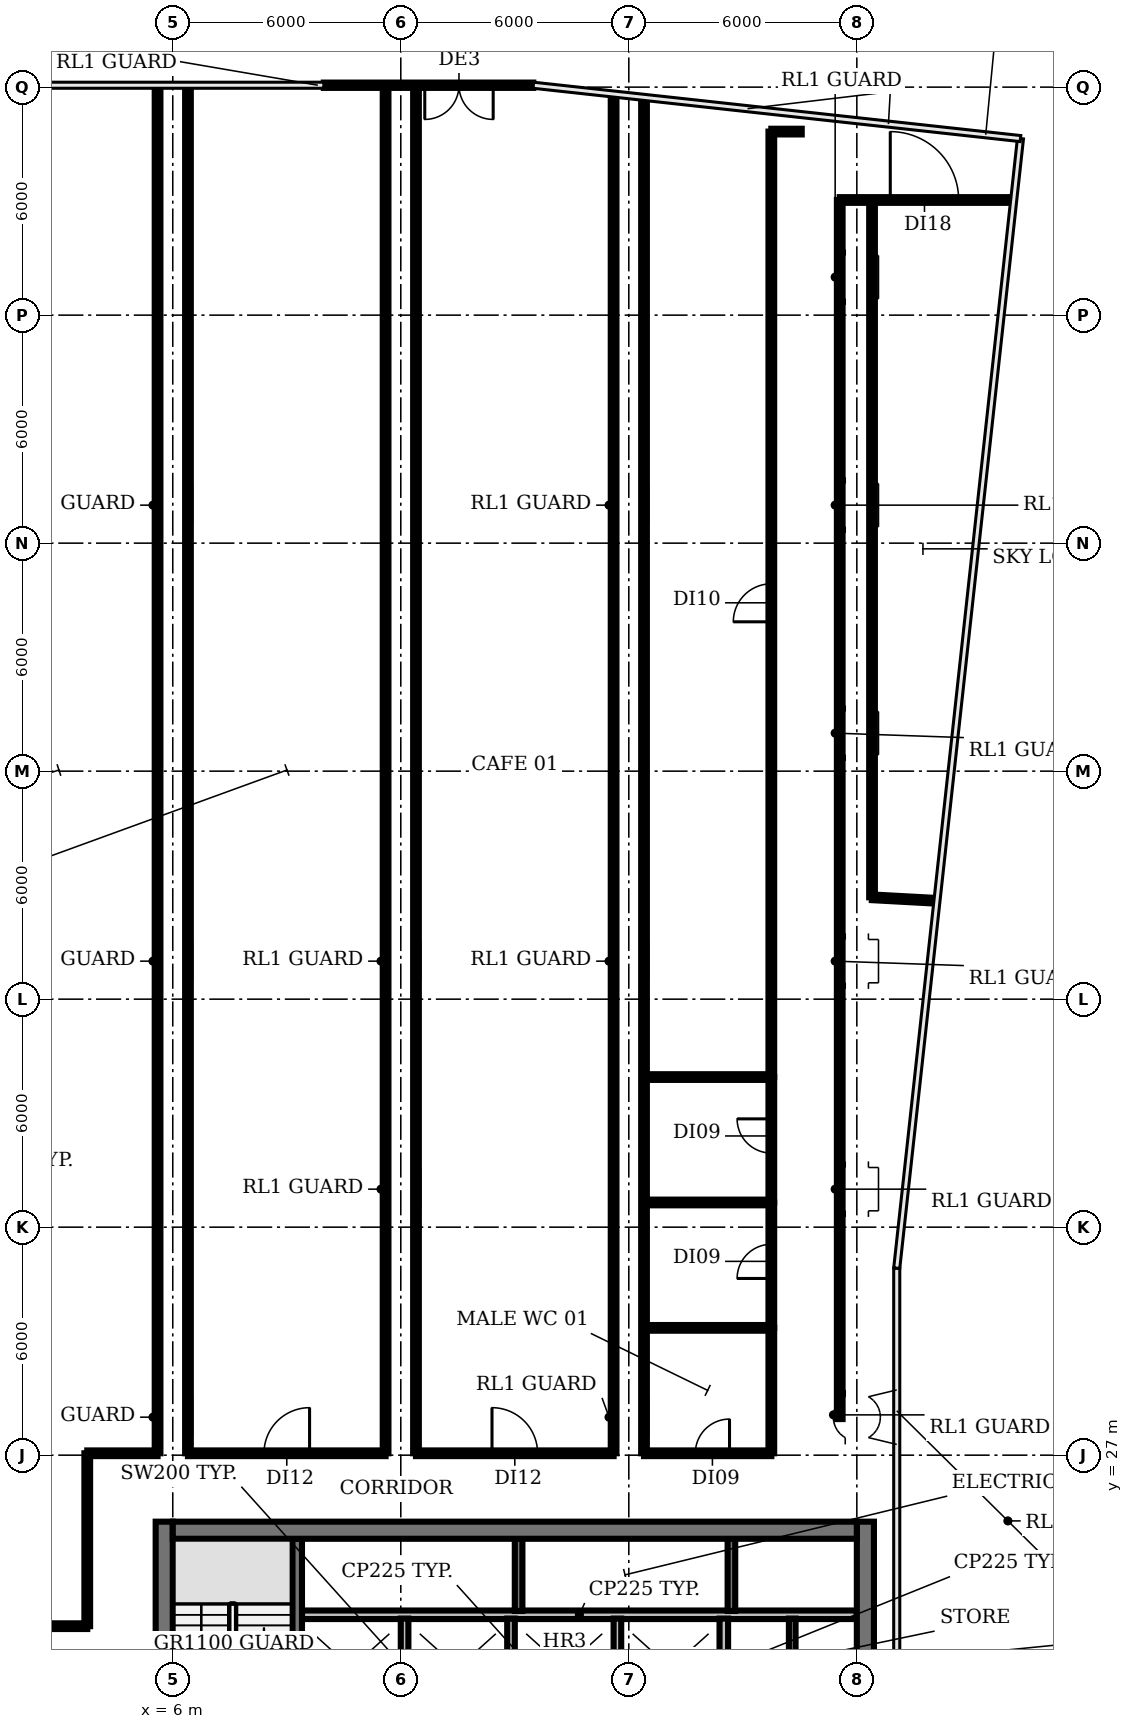
"""IFC4 building model, lengths in metres.
Left out: names, types, materials, properties, quantities, classifications, styles, units other than length and angle.
Written with IfcOpenShell. Run it as: python <this file> out.ifc"""

import sys

from ifc_helpers import new_model, si_unit, direction, frame, frame_2d, origin, place, context, subcontext, project, spatial, rectangle, extrude, element, fill, save


model = new_model("IFC4")
c1 = context("Model", 3, precision=1e-05, world=origin(), true_north=direction((0.0, 1.0)))
c2 = subcontext(c1, "Body", "Model", "MODEL_VIEW")
j1 = project(units=[si_unit("LENGTHUNIT", "METRE"), si_unit("PLANEANGLEUNIT", "RADIAN")], contexts=[c1])
p1 = place(None, origin())
s1 = spatial("IfcSite", under=j1, at=p1, CompositionType="ELEMENT")
p2 = place(p1, origin())
s2 = spatial("IfcBuilding", under=s1, at=p2, CompositionType="ELEMENT")
p3 = place(p2, frame((0.0, 0.0, 255.8)))
s3 = spatial("IfcBuildingStorey", under=s2, at=p3, CompositionType="ELEMENT", Elevation=255.8)
p4 = place(p3, frame((15.487, 63.05, 0.0), z_axis=(0.0, 0.0, 1.0), x_axis=(-1.0, 0.0, 0.0)))
e1 = element("IfcWall", 1, at=p4, inside=s3, PredefinedType="SOLIDWALL", context=c2, shape_type="SweptSolid", body=[
    extrude(rectangle(XDim=5.512, YDim=0.14, at=frame_2d((2.756, 0.0))), origin(), (0.0, 0.0, 1.0), 8.05),
])
p5 = place(p4, frame((1.056, 0.0, 0.0)))
e2 = element("IfcOpeningElement", 2, at=p5, cuts=e1, PredefinedType="OPENING", context=c2, shape_type="SweptSolid", body=[
    extrude(rectangle(XDim=1.8, YDim=2.4, at=frame_2d((0.9, 1.2))), frame((0.0, 0.08, 0.0), z_axis=(0.0, -1.0, 0.0), x_axis=(1.0, 0.0, 0.0)), (0.0, 0.0, 1.0), 0.16),
])
p6 = place(p3, frame((9.4, 22.8, 0.0), z_axis=(0.0, 0.0, 1.0), x_axis=(1.0, 0.0, 0.0)))
e3 = element("IfcWall", 3, at=p6, inside=s3, PredefinedType="PARTITIONING", context=c2, shape_type="SweptSolid", body=[
    extrude(rectangle(XDim=14.6, YDim=0.225, at=frame_2d((7.3, 0.0))), origin(), (0.0, 0.0, 1.0), 8.05),
])
p7 = place(p3, frame((9.275, 18.375, 0.0), z_axis=(0.0, 0.0, 1.0), x_axis=(0.0, 1.0, 0.0)))
e4 = element("IfcWall", 4, at=p7, inside=s3, PredefinedType="SHEAR", context=c2, shape_type="SweptSolid", body=[
    extrude(rectangle(XDim=6.425, YDim=0.25, at=frame_2d((3.212, 0.0))), origin(), (0.0, 0.0, 1.0), 8.05),
])
for number, where, z_axis, x_axis in (
    (5, (12.1, 20.1, 0.0), (0.0, 0.0, 1.0), (0.0, 1.0, 0.0)),
    (6, (14.9, 20.1, 0.0), (0.0, 0.0, 1.0), (0.0, 1.0, 0.0)),
):
    element("IfcWall", number, at=place(p3, frame(where, z_axis=z_axis, x_axis=x_axis)), inside=s3, PredefinedType="SOLIDWALL", context=c2, shape_type="SweptSolid", body=[
        extrude(rectangle(XDim=2.6, YDim=0.2, at=frame_2d((1.3, 0.0))), origin(), (0.0, 0.0, 1.0), 8.05),
    ])
p8 = place(p3, frame((15.1, 22.9, 0.0), z_axis=(0.0, 0.0, 1.0), x_axis=(0.0, 1.0, 0.0)))
e7 = element("IfcWall", 7, at=p8, inside=s3, PredefinedType="SHEAR", context=c2, shape_type="SweptSolid", body=[
    extrude(rectangle(XDim=1.9, YDim=0.2, at=frame_2d((0.95, 0.0))), origin(), (0.0, 0.0, 1.0), 8.05),
])
p9 = place(p3, frame((17.7, 20.1, 0.0), z_axis=(0.0, 0.0, 1.0), x_axis=(0.0, 1.0, 0.0)))
e8 = element("IfcWall", 8, at=p9, inside=s3, PredefinedType="SOLIDWALL", context=c2, shape_type="SweptSolid", body=[
    extrude(rectangle(XDim=2.6, YDim=0.2, at=frame_2d((1.3, 0.0))), origin(), (0.0, 0.0, 1.0), 8.05),
])
p10 = place(p3, frame((20.5, 20.1, 0.0), z_axis=(0.0, 0.0, 1.0), x_axis=(0.0, 1.0, 0.0)))
e9 = element("IfcWall", 9, at=p10, inside=s3, PredefinedType="PARTITIONING", context=c2, shape_type="SweptSolid", body=[
    extrude(rectangle(XDim=2.6, YDim=0.225, at=frame_2d((1.3, 0.0))), origin(), (0.0, 0.0, 1.0), 8.05),
])
p11 = place(p3, frame((20.7, 22.9, 0.0), z_axis=(0.0, 0.0, 1.0), x_axis=(0.0, 1.0, 0.0)))
e10 = element("IfcWall", 10, at=p11, inside=s3, PredefinedType="SHEAR", context=c2, shape_type="SweptSolid", body=[
    extrude(rectangle(XDim=1.9, YDim=0.2, at=frame_2d((0.95, 0.0))), origin(), (0.0, 0.0, 1.0), 8.05),
])
p12 = place(p3, frame((22.3, 20.1, 0.0), z_axis=(0.0, 0.0, 1.0), x_axis=(0.0, 1.0, 0.0)))
e11 = element("IfcWall", 11, at=p12, inside=s3, PredefinedType="PARTITIONING", context=c2, shape_type="SweptSolid", body=[
    extrude(rectangle(XDim=2.6, YDim=0.175, at=frame_2d((1.3, 0.0))), origin(), (0.0, 0.0, 1.0), 8.05),
])
p13 = place(p3, frame((5.775, 4.95, 0.0), z_axis=(0.0, 0.0, 1.0), x_axis=(0.0, 1.0, 0.0)))
e12 = element("IfcWall", 12, at=p13, inside=s3, PredefinedType="SHEAR", context=c2, shape_type="SweptSolid", body=[
    extrude(rectangle(XDim=20.3, YDim=0.45, at=frame_2d((10.15, 0.0))), origin(), (0.0, 0.0, 1.0), 8.05),
])
p14 = place(p13, frame((0.7, 0.0, 0.0)))
e13 = element("IfcOpeningElement", 13, at=p14, cuts=e12, PredefinedType="OPENING", context=c2, shape_type="SweptSolid", body=[
    extrude(rectangle(XDim=1.5, YDim=2.1, at=frame_2d((0.75, 1.05))), frame((0.0, 0.235, 0.0), z_axis=(0.0, -1.0, 0.0), x_axis=(1.0, 0.0, 0.0)), (0.0, 0.0, 1.0), 0.47),
])
p15 = place(p13, frame((7.15, 0.0, 0.0)))
e14 = element("IfcOpeningElement", 14, at=p15, cuts=e12, PredefinedType="OPENING", context=c2, shape_type="SweptSolid", body=[
    extrude(rectangle(XDim=1.2, YDim=2.1, at=frame_2d((0.6, 1.05))), frame((0.0, 0.235, 0.0), z_axis=(0.0, -1.0, 0.0), x_axis=(1.0, 0.0, 0.0)), (0.0, 0.0, 1.0), 0.47),
])
p16 = place(p13, frame((13.7, 0.0, 0.0)))
e15 = element("IfcOpeningElement", 15, at=p16, cuts=e12, PredefinedType="OPENING", context=c2, shape_type="SweptSolid", body=[
    extrude(rectangle(XDim=1.2, YDim=2.1, at=frame_2d((0.6, 1.05))), frame((0.0, 0.235, 0.0), z_axis=(0.0, -1.0, 0.0), x_axis=(1.0, 0.0, 0.0)), (0.0, 0.0, 1.0), 0.47),
])
p17 = place(p3, frame((24.225, 25.25, 0.0), z_axis=(0.0, 0.0, 1.0), x_axis=(0.0, -1.0, 0.0)))
e16 = element("IfcWall", 16, at=p17, inside=s3, PredefinedType="SHEAR", context=c2, shape_type="SweptSolid", body=[
    extrude(rectangle(XDim=20.3, YDim=0.45, at=frame_2d((10.15, 0.0))), origin(), (0.0, 0.0, 1.0), 8.05),
])
p18 = place(p17, frame((18.1, 0.0, 0.0)))
e17 = element("IfcOpeningElement", 17, at=p18, cuts=e16, PredefinedType="OPENING", context=c2, shape_type="SweptSolid", body=[
    extrude(rectangle(XDim=1.5, YDim=2.1, at=frame_2d((0.75, 1.05))), frame((0.0, 0.235, 0.0), z_axis=(0.0, -1.0, 0.0), x_axis=(1.0, 0.0, 0.0)), (0.0, 0.0, 1.0), 0.47),
])
p19 = place(p17, frame((12.0, 0.0, 0.0)))
e18 = element("IfcOpeningElement", 18, at=p19, cuts=e16, PredefinedType="OPENING", context=c2, shape_type="SweptSolid", body=[
    extrude(rectangle(XDim=0.9, YDim=2.1, at=frame_2d((0.45, 1.05))), frame((0.0, 0.235, 0.0), z_axis=(0.0, -1.0, 0.0), x_axis=(1.0, 0.0, 0.0)), (0.0, 0.0, 1.0), 0.47),
])
p20 = place(p17, frame((6.0, 0.0, 0.0)))
e19 = element("IfcOpeningElement", 19, at=p20, cuts=e16, PredefinedType="OPENING", context=c2, shape_type="SweptSolid", body=[
    extrude(rectangle(XDim=2.0, YDim=2.1, at=frame_2d((1.0, 1.05))), frame((0.0, 0.235, 0.0), z_axis=(0.0, -1.0, 0.0), x_axis=(1.0, 0.0, 0.0)), (0.0, 0.0, 1.0), 0.47),
])
p21 = place(p3, frame((6.0, 25.025, 0.0), z_axis=(0.0, 0.0, 1.0), x_axis=(1.0, 0.0, 0.0)))
e20 = element("IfcWall", 20, at=p21, inside=s3, PredefinedType="SHEAR", context=c2, shape_type="SweptSolid", body=[
    extrude(rectangle(XDim=18.0, YDim=0.45, at=frame_2d((9.0, 0.0))), origin(), (0.0, 0.0, 1.0), 8.05),
])
p22 = place(p3, frame((2.64, 22.5, 0.0), z_axis=(0.0, 0.0, 1.0), x_axis=(1.0, 0.0, 0.0)))
e21 = element("IfcWall", 21, at=p22, inside=s3, PredefinedType="PARTITIONING", context=c2, shape_type="SweptSolid", body=[
    extrude(rectangle(XDim=1.11, YDim=0.15, at=frame_2d((0.555, 0.0))), origin(), (0.0, 0.0, 1.0), 6.33),
])
p23 = place(p3, frame((3.75, 22.5, 0.0), z_axis=(0.0, 0.0, 1.0), x_axis=(0.0, 1.0, 0.0)))
e22 = element("IfcWall", 22, at=p23, inside=s3, PredefinedType="PARTITIONING", context=c2, shape_type="SweptSolid", body=[
    extrude(rectangle(XDim=4.55, YDim=0.15, at=frame_2d((2.275, 0.0))), origin(), (0.0, 0.0, 1.0), 6.33),
])
p24 = place(p3, frame((3.75, 27.05, 0.0), z_axis=(0.0, 0.0, 1.0), x_axis=(1.0, 0.0, 0.0)))
e23 = element("IfcWall", 23, at=p24, inside=s3, PredefinedType="PARTITIONING", context=c2, shape_type="SweptSolid", body=[
    extrude(rectangle(XDim=1.85, YDim=0.15, at=frame_2d((0.925, 0.0))), origin(), (0.0, 0.0, 1.0), 6.33),
])
for number, where, z_axis, x_axis in (
    (24, (5.6, 27.05, 0.0), (0.0, 0.0, 1.0), (0.0, 1.0, 0.0)),
    (25, (6.4, 27.05, 0.0), (0.0, 0.0, 1.0), (0.0, 1.0, 0.0)),
):
    element("IfcWall", number, at=place(p3, frame(where, z_axis=z_axis, x_axis=x_axis)), inside=s3, PredefinedType="PARTITIONING", context=c2, shape_type="SweptSolid", body=[
        extrude(rectangle(XDim=35.95, YDim=0.15, at=frame_2d((17.975, 0.0))), origin(), (0.0, 0.0, 1.0), 6.33),
    ])
p25 = place(p3, frame((6.4, 27.05, 0.0), z_axis=(0.0, 0.0, 1.0), x_axis=(1.0, 0.0, 0.0)))
e26 = element("IfcWall", 26, at=p25, inside=s3, PredefinedType="PARTITIONING", context=c2, shape_type="SweptSolid", body=[
    extrude(rectangle(XDim=5.2, YDim=0.15, at=frame_2d((2.6, 0.0))), origin(), (0.0, 0.0, 1.0), 6.33),
])
p26 = place(p25, frame((2.0, 0.0, 0.0)))
e27 = element("IfcOpeningElement", 27, at=p26, cuts=e26, PredefinedType="OPENING", context=c2, shape_type="SweptSolid", body=[
    extrude(rectangle(XDim=1.2, YDim=2.1, at=frame_2d((0.6, 1.05))), frame((0.0, 0.085, 0.0), z_axis=(0.0, -1.0, 0.0), x_axis=(1.0, 0.0, 0.0)), (0.0, 0.0, 1.0), 0.17),
])
for number, where, z_axis, x_axis in (
    (28, (11.6, 27.05, 0.0), (0.0, 0.0, 1.0), (0.0, 1.0, 0.0)),
    (29, (12.4, 27.05, 0.0), (0.0, 0.0, 1.0), (0.0, 1.0, 0.0)),
):
    element("IfcWall", number, at=place(p3, frame(where, z_axis=z_axis, x_axis=x_axis)), inside=s3, PredefinedType="PARTITIONING", context=c2, shape_type="SweptSolid", body=[
        extrude(rectangle(XDim=35.95, YDim=0.15, at=frame_2d((17.975, 0.0))), origin(), (0.0, 0.0, 1.0), 6.33),
    ])
p27 = place(p3, frame((12.4, 27.05, 0.0), z_axis=(0.0, 0.0, 1.0), x_axis=(1.0, 0.0, 0.0)))
e30 = element("IfcWall", 30, at=p27, inside=s3, PredefinedType="PARTITIONING", context=c2, shape_type="SweptSolid", body=[
    extrude(rectangle(XDim=5.2, YDim=0.15, at=frame_2d((2.6, 0.0))), origin(), (0.0, 0.0, 1.0), 6.33),
])
p28 = place(p27, frame((2.0, 0.0, 0.0)))
e31 = element("IfcOpeningElement", 31, at=p28, cuts=e30, PredefinedType="OPENING", context=c2, shape_type="SweptSolid", body=[
    extrude(rectangle(XDim=1.2, YDim=2.1, at=frame_2d((0.6, 1.05))), frame((0.0, 0.085, 0.0), z_axis=(0.0, -1.0, 0.0), x_axis=(1.0, 0.0, 0.0)), (0.0, 0.0, 1.0), 0.17),
])
p29 = place(p3, frame((17.6, 27.05, 0.0), z_axis=(0.0, 0.0, 1.0), x_axis=(0.0, 1.0, 0.0)))
e32 = element("IfcWall", 32, at=p29, inside=s3, PredefinedType="PARTITIONING", context=c2, shape_type="SweptSolid", body=[
    extrude(rectangle(XDim=35.72, YDim=0.15, at=frame_2d((17.86, 0.0))), origin(), (0.0, 0.0, 1.0), 6.33),
])
p30 = place(p3, frame((18.4, 27.05, 0.0), z_axis=(0.0, 0.0, 1.0), x_axis=(0.0, 1.0, 0.0)))
e33 = element("IfcWall", 33, at=p30, inside=s3, PredefinedType="PARTITIONING", context=c2, shape_type="SweptSolid", body=[
    extrude(rectangle(XDim=35.63, YDim=0.15, at=frame_2d((17.815, 0.0))), origin(), (0.0, 0.0, 1.0), 6.33),
])
p31 = place(p3, frame((18.4, 27.05, 0.0), z_axis=(0.0, 0.0, 1.0), x_axis=(1.0, 0.0, 0.0)))
e34 = element("IfcWall", 34, at=p31, inside=s3, PredefinedType="PARTITIONING", context=c2, shape_type="SweptSolid", body=[
    extrude(rectangle(XDim=3.35, YDim=0.15, at=frame_2d((1.675, 0.0))), origin(), (0.0, 0.0, 1.0), 6.33),
])
p32 = place(p31, frame((1.35, 0.0, 0.0)))
e35 = element("IfcOpeningElement", 35, at=p32, cuts=e34, PredefinedType="OPENING", context=c2, shape_type="SweptSolid", body=[
    extrude(rectangle(XDim=0.9, YDim=2.1, at=frame_2d((0.45, 1.05))), frame((0.0, 0.085, 0.0), z_axis=(0.0, -1.0, 0.0), x_axis=(1.0, 0.0, 0.0)), (0.0, 0.0, 1.0), 0.17),
])
for number, where, z_axis, x_axis in (
    (36, (18.4, 30.35, 0.0), (0.0, 0.0, 1.0), (1.0, 0.0, 0.0)),
    (37, (18.4, 33.65, 0.0), (0.0, 0.0, 1.0), (1.0, 0.0, 0.0)),
    (38, (18.4, 36.95, 0.0), (0.0, 0.0, 1.0), (1.0, 0.0, 0.0)),
):
    element("IfcWall", number, at=place(p3, frame(where, z_axis=z_axis, x_axis=x_axis)), inside=s3, PredefinedType="PARTITIONING", context=c2, shape_type="SweptSolid", body=[
        extrude(rectangle(XDim=3.35, YDim=0.15, at=frame_2d((1.675, 0.0))), origin(), (0.0, 0.0, 1.0), 6.33),
    ])
p33 = place(p3, frame((21.75, 27.05, 0.0), z_axis=(0.0, 0.0, 1.0), x_axis=(0.0, 1.0, 0.0)))
e39 = element("IfcWall", 39, at=p33, inside=s3, PredefinedType="PARTITIONING", context=c2, shape_type="SweptSolid", body=[
    extrude(rectangle(XDim=3.3, YDim=0.15, at=frame_2d((1.65, 0.0))), origin(), (0.0, 0.0, 1.0), 6.33),
])
p34 = place(p3, frame((21.75, 30.35, 0.0), z_axis=(0.0, 0.0, 1.0), x_axis=(0.0, 1.0, 0.0)))
e40 = element("IfcWall", 40, at=p34, inside=s3, PredefinedType="PARTITIONING", context=c2, shape_type="SweptSolid", body=[
    extrude(rectangle(XDim=3.3, YDim=0.15, at=frame_2d((1.65, 0.0))), origin(), (0.0, 0.0, 1.0), 6.33),
])
p35 = place(p34, frame((1.3, 0.0, 0.0)))
e41 = element("IfcOpeningElement", 41, at=p35, cuts=e40, PredefinedType="OPENING", context=c2, shape_type="SweptSolid", body=[
    extrude(rectangle(XDim=0.9, YDim=2.1, at=frame_2d((0.45, 1.05))), frame((0.0, 0.085, 0.0), z_axis=(0.0, -1.0, 0.0), x_axis=(1.0, 0.0, 0.0)), (0.0, 0.0, 1.0), 0.17),
])
p36 = place(p3, frame((21.75, 33.65, 0.0), z_axis=(0.0, 0.0, 1.0), x_axis=(0.0, 1.0, 0.0)))
e42 = element("IfcWall", 42, at=p36, inside=s3, PredefinedType="PARTITIONING", context=c2, shape_type="SweptSolid", body=[
    extrude(rectangle(XDim=3.3, YDim=0.15, at=frame_2d((1.65, 0.0))), origin(), (0.0, 0.0, 1.0), 6.33),
])
p37 = place(p36, frame((1.3, 0.0, 0.0)))
e43 = element("IfcOpeningElement", 43, at=p37, cuts=e42, PredefinedType="OPENING", context=c2, shape_type="SweptSolid", body=[
    extrude(rectangle(XDim=0.9, YDim=2.1, at=frame_2d((0.45, 1.05))), frame((0.0, 0.085, 0.0), z_axis=(0.0, -1.0, 0.0), x_axis=(1.0, 0.0, 0.0)), (0.0, 0.0, 1.0), 0.17),
])
p38 = place(p3, frame((21.75, 36.95, 0.0), z_axis=(0.0, 0.0, 1.0), x_axis=(0.0, 1.0, 0.0)))
e44 = element("IfcWall", 44, at=p38, inside=s3, PredefinedType="PARTITIONING", context=c2, shape_type="SweptSolid", body=[
    extrude(rectangle(XDim=24.88, YDim=0.15, at=frame_2d((12.44, 0.0))), origin(), (0.0, 0.0, 1.0), 6.33),
])
p39 = place(p38, frame((11.98, 0.0, 0.0)))
e45 = element("IfcOpeningElement", 45, at=p39, cuts=e44, PredefinedType="OPENING", context=c2, shape_type="SweptSolid", body=[
    extrude(rectangle(XDim=1.0, YDim=2.1, at=frame_2d((0.5, 1.05))), frame((0.0, 0.085, 0.0), z_axis=(0.0, -1.0, 0.0), x_axis=(1.0, 0.0, 0.0)), (0.0, 0.0, 1.0), 0.17),
])
p40 = place(p3, frame((21.75, 61.83, 0.0), z_axis=(0.0, 0.0, 1.0), x_axis=(1.0, 0.0, 0.0)))
e46 = element("IfcWall", 46, at=p40, inside=s3, PredefinedType="PARTITIONING", context=c2, shape_type="SweptSolid", body=[
    extrude(rectangle(XDim=0.8, YDim=0.15, at=frame_2d((0.4, 0.0))), origin(), (0.0, 0.0, 1.0), 6.33),
])
p41 = place(p3, frame((23.55, 27.95, 0.0), z_axis=(0.0, 0.0, 1.0), x_axis=(0.0, 1.0, 0.0)))
e47 = element("IfcWall", 47, at=p41, inside=s3, PredefinedType="PARTITIONING", context=c2, shape_type="SweptSolid", body=[
    extrude(rectangle(XDim=32.08, YDim=0.15, at=frame_2d((16.04, 0.0))), origin(), (0.0, 0.0, 1.0), 6.33),
])
p42 = place(p3, frame((23.55, 60.03, 0.0), z_axis=(0.0, 0.0, 1.0), x_axis=(1.0, 0.0, 0.0)))
e48 = element("IfcWall", 48, at=p42, inside=s3, PredefinedType="PARTITIONING", context=c2, shape_type="SweptSolid", body=[
    extrude(rectangle(XDim=4.53, YDim=0.15, at=frame_2d((2.265, 0.0))), origin(), (0.0, 0.0, 1.0), 6.33),
])
p43 = place(p42, frame((1.33, 0.0, 0.0)))
e49 = element("IfcOpeningElement", 49, at=p43, cuts=e48, PredefinedType="OPENING", context=c2, shape_type="SweptSolid", body=[
    extrude(rectangle(XDim=1.8, YDim=2.1, at=frame_2d((0.9, 1.05))), frame((0.0, 0.085, 0.0), z_axis=(0.0, -1.0, 0.0), x_axis=(1.0, 0.0, 0.0)), (0.0, 0.0, 1.0), 0.17),
])
p44 = place(p3, frame((24.4, 41.68, 0.0), z_axis=(0.0, 0.0, 1.0), x_axis=(0.0, 1.0, 0.0)))
e50 = element("IfcWall", 50, at=p44, inside=s3, PredefinedType="PARTITIONING", context=c2, shape_type="SweptSolid", body=[
    extrude(rectangle(XDim=18.34, YDim=0.15, at=frame_2d((9.17, 0.0))), origin(), (0.0, 0.0, 1.0), 6.33),
])
p45 = place(p3, frame((24.4, 41.68, 0.0), z_axis=(0.0, 0.0, 1.0), x_axis=(0.998538848833, -0.054038572996, 0.0)))
e51 = element("IfcWall", 51, at=p45, inside=s3, PredefinedType="PARTITIONING", context=c2, shape_type="SweptSolid", body=[
    extrude(rectangle(XDim=1.663, YDim=0.15, at=frame_2d((0.831, 0.0))), origin(), (0.0, 0.0, 1.0), 6.33),
])
p46 = place(p5, origin())
e52 = element("IfcDoor", 52, at=p46, inside=s3, OperationType="DOUBLE_DOOR_DOUBLE_SWING", PredefinedType="DOOR", context=c2, shape_type="SweptSolid", body=[
    extrude(rectangle(XDim=1.8, YDim=2.4, at=frame_2d((0.9, 1.2))), frame((0.0, 0.025, 0.0), z_axis=(0.0, -1.0, 0.0), x_axis=(1.0, 0.0, 0.0)), (0.0, 0.0, 1.0), 0.05),
])
fill(e2, e52)
p47 = place(p26, origin())
e53 = element("IfcDoor", 53, at=p47, inside=s3, OperationType="SINGLE_SWING_RIGHT", PredefinedType="DOOR", context=c2, shape_type="SweptSolid", body=[
    extrude(rectangle(XDim=1.2, YDim=2.1, at=frame_2d((0.6, 1.05))), frame((0.0, 0.025, 0.0), z_axis=(0.0, -1.0, 0.0), x_axis=(1.0, 0.0, 0.0)), (0.0, 0.0, 1.0), 0.05),
])
fill(e27, e53)
p48 = place(p28, origin())
e54 = element("IfcDoor", 54, at=p48, inside=s3, OperationType="SINGLE_SWING_LEFT", PredefinedType="DOOR", context=c2, shape_type="SweptSolid", body=[
    extrude(rectangle(XDim=1.2, YDim=2.1, at=frame_2d((0.6, 1.05))), frame((0.0, 0.025, 0.0), z_axis=(0.0, -1.0, 0.0), x_axis=(1.0, 0.0, 0.0)), (0.0, 0.0, 1.0), 0.05),
])
fill(e31, e54)
p49 = place(p32, origin())
e55 = element("IfcDoor", 55, at=p49, inside=s3, OperationType="SINGLE_SWING_RIGHT", PredefinedType="DOOR", context=c2, shape_type="SweptSolid", body=[
    extrude(rectangle(XDim=0.9, YDim=2.1, at=frame_2d((0.45, 1.05))), frame((0.0, 0.025, 0.0), z_axis=(0.0, -1.0, 0.0), x_axis=(1.0, 0.0, 0.0)), (0.0, 0.0, 1.0), 0.05),
])
fill(e35, e55)
p50 = place(p35, origin())
e56 = element("IfcDoor", 56, at=p50, inside=s3, OperationType="SINGLE_SWING_LEFT", PredefinedType="DOOR", context=c2, shape_type="SweptSolid", body=[
    extrude(rectangle(XDim=0.9, YDim=2.1, at=frame_2d((0.45, 1.05))), frame((0.0, 0.025, 0.0), z_axis=(0.0, -1.0, 0.0), x_axis=(1.0, 0.0, 0.0)), (0.0, 0.0, 1.0), 0.05),
])
fill(e41, e56)
p51 = place(p37, origin())
e57 = element("IfcDoor", 57, at=p51, inside=s3, OperationType="SINGLE_SWING_RIGHT", PredefinedType="DOOR", context=c2, shape_type="SweptSolid", body=[
    extrude(rectangle(XDim=0.9, YDim=2.1, at=frame_2d((0.45, 1.05))), frame((0.0, 0.025, 0.0), z_axis=(0.0, -1.0, 0.0), x_axis=(1.0, 0.0, 0.0)), (0.0, 0.0, 1.0), 0.05),
])
fill(e43, e57)
p52 = place(p39, origin())
e58 = element("IfcDoor", 58, at=p52, inside=s3, OperationType="SINGLE_SWING_LEFT", PredefinedType="DOOR", context=c2, shape_type="SweptSolid", body=[
    extrude(rectangle(XDim=1.0, YDim=2.1, at=frame_2d((0.5, 1.05))), frame((0.0, 0.025, 0.0), z_axis=(0.0, -1.0, 0.0), x_axis=(1.0, 0.0, 0.0)), (0.0, 0.0, 1.0), 0.05),
])
fill(e45, e58)
p53 = place(p43, origin())
e59 = element("IfcDoor", 59, at=p53, inside=s3, OperationType="SINGLE_SWING_LEFT", PredefinedType="DOOR", context=c2, shape_type="SweptSolid", body=[
    extrude(rectangle(XDim=1.8, YDim=2.1, at=frame_2d((0.9, 1.05))), frame((0.0, 0.025, 0.0), z_axis=(0.0, -1.0, 0.0), x_axis=(1.0, 0.0, 0.0)), (0.0, 0.0, 1.0), 0.05),
])
fill(e49, e59)
save(model, sys.argv[1])
